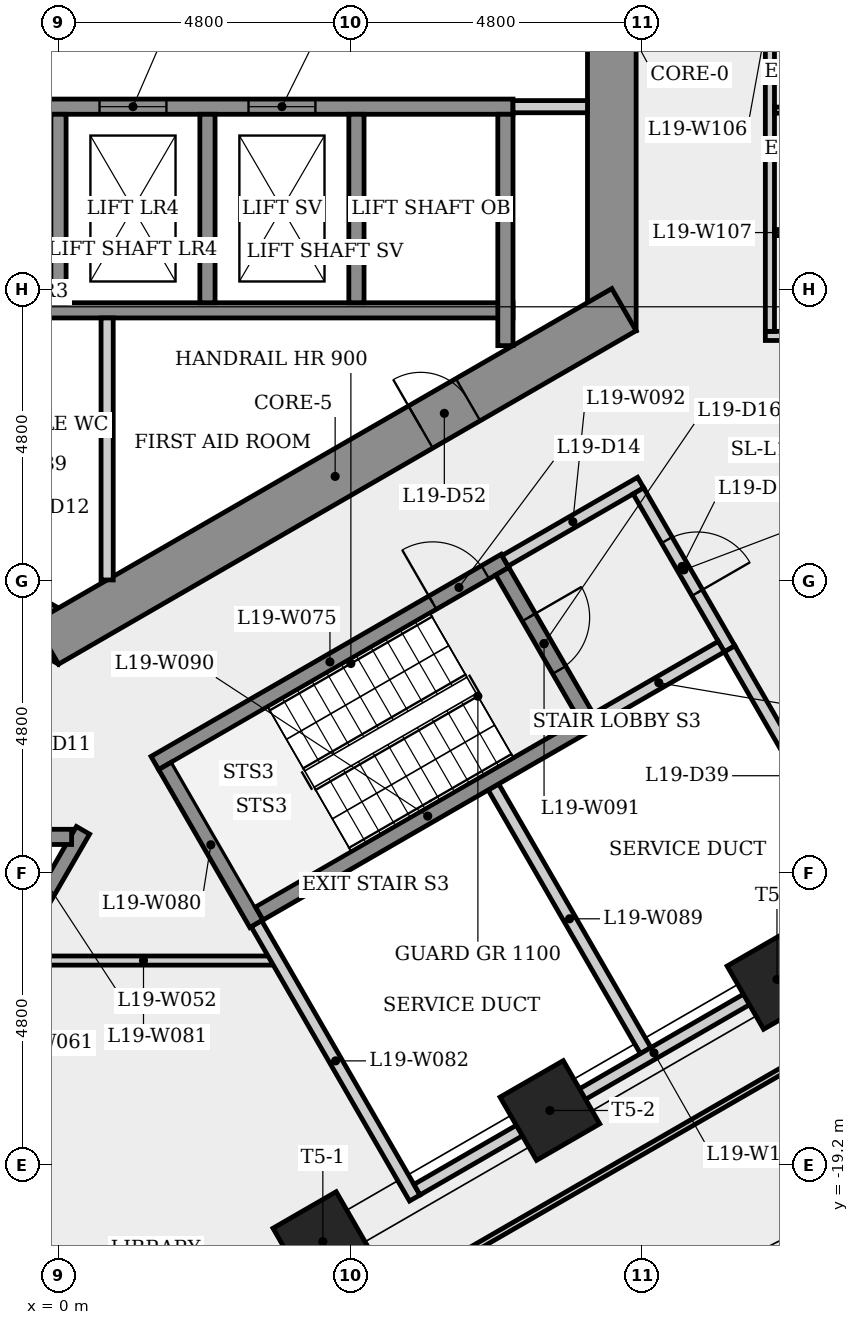
"""IFC4 building model, lengths in metres.
Left out: names, types, materials, properties, quantities, classifications, styles, units other than length and angle.
Written with IfcOpenShell. Run it as: python <this file> out.ifc"""

import sys

from ifc_helpers import new_model, si_unit, direction, frame, frame_2d, origin, origin_2d, place, context, subcontext, project, spatial, rectangle, extrude, element, fill, save


model = new_model("IFC4")
c1 = context("Model", 3, precision=1e-05, world=origin(), true_north=direction((0.0, 1.0)))
c2 = subcontext(c1, "Body", "Model", "MODEL_VIEW")
j1 = project(units=[si_unit("LENGTHUNIT", "METRE"), si_unit("PLANEANGLEUNIT", "RADIAN")], contexts=[c1])
p1 = place(None, origin())
s1 = spatial("IfcSite", under=j1, at=p1, CompositionType="ELEMENT")
p2 = place(p1, origin())
s2 = spatial("IfcBuilding", under=s1, at=p2, CompositionType="ELEMENT")
p3 = place(p2, frame((0.0, 0.0, 74.3)))
s3 = spatial("IfcBuildingStorey", under=s2, at=p3, CompositionType="ELEMENT", Elevation=74.3)
p4 = place(p3, frame((9.1, -5.485, 0.0), z_axis=(0.0, 0.0, 1.0), x_axis=(0.0, 1.0, 0.0)))
e1 = element("IfcWall", 1, at=p4, inside=s3, PredefinedType="SHEAR", context=c2, shape_type="SweptSolid", body=[
    extrude(rectangle(XDim=10.97, YDim=0.8, at=frame_2d((5.485, 0.0))), origin(), (0.0, 0.0, 1.0), 4.0),
])
p5 = place(p4, frame((4.685, 0.0, 0.0)))
e2 = element("IfcOpeningElement", 2, at=p5, cuts=e1, PredefinedType="OPENING", context=c2, shape_type="SweptSolid", body=[
    extrude(rectangle(XDim=1.6, YDim=2.1, at=frame_2d((0.8, 1.05))), frame((0.0, 0.41, 0.0), z_axis=(0.0, -1.0, 0.0), x_axis=(1.0, 0.0, 0.0)), (0.0, 0.0, 1.0), 0.82),
])
p6 = place(p3, frame((-9.3, -5.138, 0.0), z_axis=(0.0, 0.0, 1.0), x_axis=(0.866023993627, -0.500002442456, 0.0)))
e3 = element("IfcWall", 3, at=p6, inside=s3, PredefinedType="SHEAR", context=c2, shape_type="SweptSolid", body=[
    extrude(rectangle(XDim=10.97, YDim=0.8, at=frame_2d((5.485, 0.0))), origin(), (0.0, 0.0, 1.0), 4.0),
])
p7 = place(p6, frame((2.268, 0.0, 0.0)))
e4 = element("IfcOpeningElement", 4, at=p7, cuts=e3, PredefinedType="OPENING", context=c2, shape_type="SweptSolid", body=[
    extrude(rectangle(XDim=0.9, YDim=2.1, at=frame_2d((0.45, 1.05))), frame((0.0, 0.41, 0.0), z_axis=(0.0, -1.0, 0.0), x_axis=(1.0, 0.0, 0.0)), (0.0, 0.0, 1.0), 0.82),
])
p8 = place(p6, frame((8.903, 0.0, 0.0)))
e5 = element("IfcOpeningElement", 5, at=p8, cuts=e3, PredefinedType="OPENING", context=c2, shape_type="SweptSolid", body=[
    extrude(rectangle(XDim=0.9, YDim=2.1, at=frame_2d((0.45, 1.05))), frame((0.0, 0.41, 0.0), z_axis=(0.0, -1.0, 0.0), x_axis=(1.0, 0.0, 0.0)), (0.0, 0.0, 1.0), 0.82),
])
p9 = place(p3, frame((-0.2, -10.623, 0.0), z_axis=(0.0, 0.0, 1.0), x_axis=(0.866023993627, 0.500002442456, 0.0)))
e6 = element("IfcWall", 6, at=p9, inside=s3, PredefinedType="SHEAR", context=c2, shape_type="SweptSolid", body=[
    extrude(rectangle(XDim=10.97, YDim=0.8, at=frame_2d((5.485, 0.0))), origin(), (0.0, 0.0, 1.0), 4.0),
])
p10 = place(p9, frame((7.108, 0.0, 0.0)))
e7 = element("IfcOpeningElement", 7, at=p10, cuts=e6, PredefinedType="OPENING", context=c2, shape_type="SweptSolid", body=[
    extrude(rectangle(XDim=0.9, YDim=2.1, at=frame_2d((0.45, 1.05))), frame((0.0, 0.41, 0.0), z_axis=(0.0, -1.0, 0.0), x_axis=(1.0, 0.0, 0.0)), (0.0, 0.0, 1.0), 0.82),
])
for number, where, z_axis, x_axis in (
    (8, (4.348, -20.466, 0.0), (0.0, 0.0, 1.0), (0.5, -0.866, 0.0)),
    (9, (8.082, -18.31, 0.0), (0.0, 0.0, 1.0), (0.5, -0.866, 0.0)),
    (10, (11.816, -16.154, 0.0), (0.0, 0.0, 1.0), (0.5, -0.866, 0.0)),
):
    element("IfcColumn", number, at=place(p3, frame(where, z_axis=z_axis, x_axis=x_axis)), inside=s3, PredefinedType="COLUMN", context=c2, shape_type="SweptSolid", body=[
        extrude(rectangle(XDim=1.2, YDim=1.2, at=origin_2d()), origin(), (0.0, 0.0, 1.0), 4.0),
    ])
p11 = place(p3, frame((-7.225, -5.15, 0.0), z_axis=(0.0, 0.0, 1.0), x_axis=(1.0, 0.0, 0.0)))
e11 = element("IfcWall", 11, at=p11, inside=s3, PredefinedType="SHEAR", context=c2, shape_type="SweptSolid", body=[
    extrude(rectangle(XDim=14.7, YDim=0.25, at=frame_2d((7.35, 0.0))), origin(), (0.0, 0.0, 1.0), 3.6),
])
p12 = place(p3, frame((-7.225, -1.8, 0.0), z_axis=(0.0, 0.0, 1.0), x_axis=(1.0, 0.0, 0.0)))
e12 = element("IfcWall", 12, at=p12, inside=s3, PredefinedType="SHEAR", context=c2, shape_type="SweptSolid", body=[
    extrude(rectangle(XDim=14.7, YDim=0.25, at=frame_2d((7.35, 0.0))), origin(), (0.0, 0.0, 1.0), 3.6),
])
p13 = place(p12, frame((0.597, 0.0, 0.0)))
e13 = element("IfcOpeningElement", 13, at=p13, cuts=e12, PredefinedType="OPENING", context=c2, shape_type="SweptSolid", body=[
    extrude(rectangle(XDim=1.1, YDim=2.1, at=frame_2d((0.55, 1.05))), frame((0.0, 0.135, 0.0), z_axis=(0.0, -1.0, 0.0), x_axis=(1.0, 0.0, 0.0)), (0.0, 0.0, 1.0), 0.27),
])
p14 = place(p12, frame((3.0, 0.0, 0.0)))
e14 = element("IfcOpeningElement", 14, at=p14, cuts=e12, PredefinedType="OPENING", context=c2, shape_type="SweptSolid", body=[
    extrude(rectangle(XDim=1.1, YDim=2.1, at=frame_2d((0.55, 1.05))), frame((0.0, 0.135, 0.0), z_axis=(0.0, -1.0, 0.0), x_axis=(1.0, 0.0, 0.0)), (0.0, 0.0, 1.0), 0.27),
])
p15 = place(p12, frame((5.45, 0.0, 0.0)))
e15 = element("IfcOpeningElement", 15, at=p15, cuts=e12, PredefinedType="OPENING", context=c2, shape_type="SweptSolid", body=[
    extrude(rectangle(XDim=1.1, YDim=2.1, at=frame_2d((0.55, 1.05))), frame((0.0, 0.135, 0.0), z_axis=(0.0, -1.0, 0.0), x_axis=(1.0, 0.0, 0.0)), (0.0, 0.0, 1.0), 0.27),
])
p16 = place(p12, frame((7.9, 0.0, 0.0)))
e16 = element("IfcOpeningElement", 16, at=p16, cuts=e12, PredefinedType="OPENING", context=c2, shape_type="SweptSolid", body=[
    extrude(rectangle(XDim=1.1, YDim=2.1, at=frame_2d((0.55, 1.05))), frame((0.0, 0.135, 0.0), z_axis=(0.0, -1.0, 0.0), x_axis=(1.0, 0.0, 0.0)), (0.0, 0.0, 1.0), 0.27),
])
p17 = place(p12, frame((10.35, 0.0, 0.0)))
e17 = element("IfcOpeningElement", 17, at=p17, cuts=e12, PredefinedType="OPENING", context=c2, shape_type="SweptSolid", body=[
    extrude(rectangle(XDim=1.1, YDim=2.1, at=frame_2d((0.55, 1.05))), frame((0.0, 0.135, 0.0), z_axis=(0.0, -1.0, 0.0), x_axis=(1.0, 0.0, 0.0)), (0.0, 0.0, 1.0), 0.27),
])
p18 = place(p3, frame((-0.902, -15.962, 0.0), z_axis=(0.0, 0.0, 1.0), x_axis=(0.499981517636, 0.866036074319, 0.0)))
e18 = element("IfcWall", 18, at=p18, inside=s3, PredefinedType="SHEAR", context=c2, shape_type="SweptSolid", body=[
    extrude(rectangle(XDim=2.61, YDim=0.25, at=frame_2d((1.305, 0.0))), origin(), (0.0, 0.0, 1.0), 3.6),
])
p19 = place(p3, frame((-0.725, -13.81, 0.0), z_axis=(0.0, 0.0, 1.0), x_axis=(1.0, 0.0, 0.0)))
e19 = element("IfcWall", 19, at=p19, inside=s3, PredefinedType="SHEAR", context=c2, shape_type="SweptSolid", body=[
    extrude(rectangle(XDim=0.941, YDim=0.25, at=frame_2d((0.47, 0.0))), origin(), (0.0, 0.0, 1.0), 4.0),
])
p20 = place(p3, frame((0.0, -1.925, 0.0), z_axis=(0.0, 0.0, 1.0), x_axis=(0.0, -1.0, 0.0)))
e20 = element("IfcWall", 20, at=p20, inside=s3, PredefinedType="SHEAR", context=c2, shape_type="SweptSolid", body=[
    extrude(rectangle(XDim=3.1, YDim=0.25, at=frame_2d((1.55, 0.0))), origin(), (0.0, 0.0, 1.0), 4.0),
])
p21 = place(p3, frame((0.8, -5.275, 0.0), z_axis=(0.0, 0.0, 1.0), x_axis=(0.0, -1.0, 0.0)))
e21 = element("IfcWall", 21, at=p21, inside=s3, PredefinedType="PARTITIONING", context=c2, shape_type="SweptSolid", body=[
    extrude(rectangle(XDim=4.309, YDim=0.2, at=frame_2d((2.155, 0.0))), origin(), (0.0, 0.0, 1.0), 3.6),
])
p22 = place(p3, frame((1.585, -12.595, 0.0), z_axis=(0.0, 0.0, 1.0), x_axis=(0.866036417653, 0.499980922934, 0.0)))
e22 = element("IfcWall", 22, at=p22, inside=s3, PredefinedType="SHEAR", context=c2, shape_type="SweptSolid", body=[
    extrude(rectangle(XDim=6.65, YDim=0.25, at=frame_2d((3.325, 0.0))), origin(), (0.0, 0.0, 1.0), 3.6),
])
p23 = place(p22, frame((5.275, 0.0, 0.0)))
e23 = element("IfcOpeningElement", 23, at=p23, cuts=e22, PredefinedType="OPENING", context=c2, shape_type="SweptSolid", body=[
    extrude(rectangle(XDim=1.0, YDim=2.1, at=frame_2d((0.5, 1.05))), frame((0.0, 0.135, 0.0), z_axis=(0.0, -1.0, 0.0), x_axis=(1.0, 0.0, 0.0)), (0.0, 0.0, 1.0), 0.27),
])
p24 = place(p3, frame((2.45, -1.925, 0.0), z_axis=(0.0, 0.0, 1.0), x_axis=(0.0, -1.0, 0.0)))
e24 = element("IfcWall", 24, at=p24, inside=s3, PredefinedType="SHEAR", context=c2, shape_type="SweptSolid", body=[
    extrude(rectangle(XDim=3.1, YDim=0.25, at=frame_2d((1.55, 0.0))), origin(), (0.0, 0.0, 1.0), 4.0),
])
p25 = place(p3, frame((3.256, -15.239, 0.0), z_axis=(0.0, 0.0, 1.0), x_axis=(-0.50002537861, 0.866010750942, 0.0)))
e25 = element("IfcWall", 25, at=p25, inside=s3, PredefinedType="SHEAR", context=c2, shape_type="SweptSolid", body=[
    extrude(rectangle(XDim=3.0, YDim=0.25, at=frame_2d((1.5, 0.0))), origin(), (0.0, 0.0, 1.0), 3.6),
])
p26 = place(p3, frame((3.505, -15.844, 0.0), z_axis=(0.0, 0.0, 1.0), x_axis=(-1.0, 0.0, 0.0)))
e26 = element("IfcWall", 26, at=p26, inside=s3, PredefinedType="PARTITIONING", context=c2, shape_type="SweptSolid", body=[
    extrude(rectangle(XDim=4.214, YDim=0.15, at=frame_2d((2.107, 0.0))), origin(), (0.0, 0.0, 1.0), 3.6),
])
p27 = place(p3, frame((3.256, -15.239, 0.0), z_axis=(0.0, 0.0, 1.0), x_axis=(0.500021393879, -0.866013051671, 0.0)))
e27 = element("IfcWall", 27, at=p27, inside=s3, PredefinedType="PLUMBINGWALL", context=c2, shape_type="SweptSolid", body=[
    extrude(rectangle(XDim=5.208, YDim=0.2, at=frame_2d((2.604, 0.0))), origin(), (0.0, 0.0, 1.0), 3.6),
])
p28 = place(p3, frame((4.9, -1.925, 0.0), z_axis=(0.0, 0.0, 1.0), x_axis=(0.0, -1.0, 0.0)))
e28 = element("IfcWall", 28, at=p28, inside=s3, PredefinedType="SHEAR", context=c2, shape_type="SweptSolid", body=[
    extrude(rectangle(XDim=3.1, YDim=0.25, at=frame_2d((1.55, 0.0))), origin(), (0.0, 0.0, 1.0), 4.0),
])
p29 = place(p3, frame((7.153, -12.989, 0.0), z_axis=(0.0, 0.0, 1.0), x_axis=(0.499998165157, -0.866026463129, 0.0)))
e29 = element("IfcWall", 29, at=p29, inside=s3, PredefinedType="PLUMBINGWALL", context=c2, shape_type="SweptSolid", body=[
    extrude(rectangle(XDim=5.008, YDim=0.2, at=frame_2d((2.504, 0.0))), origin(), (0.0, 0.0, 1.0), 3.6),
])
p30 = place(p3, frame((3.301, -15.068, 0.0), z_axis=(0.0, 0.0, 1.0), x_axis=(0.866035036182, 0.499983315828, 0.0)))
e30 = element("IfcWall", 30, at=p30, inside=s3, PredefinedType="SHEAR", context=c2, shape_type="SweptSolid", body=[
    extrude(rectangle(XDim=6.4, YDim=0.25, at=frame_2d((3.2, 0.0))), origin(), (0.0, 0.0, 1.0), 4.0),
])
p31 = place(p3, frame((7.298, -9.441, 0.0), z_axis=(0.0, 0.0, 1.0), x_axis=(0.500034990121, -0.866005201286, 0.0)))
e31 = element("IfcWall", 31, at=p31, inside=s3, PredefinedType="SHEAR", context=c2, shape_type="SweptSolid", body=[
    extrude(rectangle(XDim=2.75, YDim=0.25, at=frame_2d((1.375, 0.0))), origin(), (0.0, 0.0, 1.0), 3.6),
])
p32 = place(p31, frame((0.875, 0.0, 0.0)))
e32 = element("IfcOpeningElement", 32, at=p32, cuts=e31, PredefinedType="OPENING", context=c2, shape_type="SweptSolid", body=[
    extrude(rectangle(XDim=1.0, YDim=2.1, at=frame_2d((0.5, 1.05))), frame((0.0, 0.135, 0.0), z_axis=(0.0, -1.0, 0.0), x_axis=(1.0, 0.0, 0.0)), (0.0, 0.0, 1.0), 0.27),
])
p33 = place(p3, frame((7.344, -9.27, 0.0), z_axis=(0.0, 0.0, 1.0), x_axis=(0.866005588531, 0.500034319456, 0.0)))
e33 = element("IfcWall", 33, at=p33, inside=s3, PredefinedType="PARTITIONING", context=c2, shape_type="SweptSolid", body=[
    extrude(rectangle(XDim=2.575, YDim=0.2, at=frame_2d((1.288, 0.0))), origin(), (0.0, 0.0, 1.0), 3.6),
])
p34 = place(p3, frame((7.35, -1.925, 0.0), z_axis=(0.0, 0.0, 1.0), x_axis=(0.0, -1.0, 0.0)))
e34 = element("IfcWall", 34, at=p34, inside=s3, PredefinedType="SHEAR", context=c2, shape_type="SweptSolid", body=[
    extrude(rectangle(XDim=3.805, YDim=0.25, at=frame_2d((1.903, 0.0))), origin(), (0.0, 0.0, 1.0), 3.6),
])
p35 = place(p3, frame((8.7, -1.8, 0.0), z_axis=(0.0, 0.0, 1.0), x_axis=(-1.0, 0.0, 0.0)))
e35 = element("IfcWall", 35, at=p35, inside=s3, PredefinedType="PARTITIONING", context=c2, shape_type="SweptSolid", body=[
    extrude(rectangle(XDim=1.225, YDim=0.2, at=frame_2d((0.613, 0.0))), origin(), (0.0, 0.0, 1.0), 3.6),
])
p36 = place(p3, frame((9.537, -8.119, 0.0), z_axis=(0.0, 0.0, 1.0), x_axis=(0.499990139034, -0.866031096941, 0.0)))
e36 = element("IfcWall", 36, at=p36, inside=s3, PredefinedType="PARTITIONING", context=c2, shape_type="SweptSolid", body=[
    extrude(rectangle(XDim=3.0, YDim=0.2, at=frame_2d((1.5, 0.0))), origin(), (0.0, 0.0, 1.0), 3.6),
])
p37 = place(p36, frame((0.935, 0.0, 0.0)))
e37 = element("IfcOpeningElement", 37, at=p37, cuts=e36, PredefinedType="OPENING", context=c2, shape_type="SweptSolid", body=[
    extrude(rectangle(XDim=1.0, YDim=2.1, at=frame_2d((0.5, 1.05))), frame((0.0, 0.11, 0.0), z_axis=(0.0, -1.0, 0.0), x_axis=(1.0, 0.0, 0.0)), (0.0, 0.0, 1.0), 0.22),
])
p38 = place(p3, frame((5.896, -19.612, 0.0), z_axis=(0.0, 0.0, 1.0), x_axis=(0.866024315419, 0.5000018851, 0.0)))
e38 = element("IfcWall", 38, at=p38, inside=s3, PredefinedType="PLUMBINGWALL", context=c2, shape_type="SweptSolid", body=[
    extrude(rectangle(XDim=9.0, YDim=0.2, at=frame_2d((4.5, 0.0))), origin(), (0.0, 0.0, 1.0), 2.675),
])
p39 = place(p3, frame((10.901, -10.681, 0.0), z_axis=(0.0, 0.0, 1.0), x_axis=(-0.866007538022, -0.500030943131, 0.0)))
e39 = element("IfcWall", 39, at=p39, inside=s3, PredefinedType="PLUMBINGWALL", context=c2, shape_type="SweptSolid", body=[
    extrude(rectangle(XDim=2.375, YDim=0.2, at=frame_2d((1.188, 0.0))), origin(), (0.0, 0.0, 1.0), 3.6),
])
p40 = place(p3, frame((11.037, -10.717, 0.0), z_axis=(0.0, 0.0, 1.0), x_axis=(0.500005202617, -0.866022400031, 0.0)))
e40 = element("IfcWall", 40, at=p40, inside=s3, PredefinedType="PLUMBINGWALL", context=c2, shape_type="SweptSolid", body=[
    extrude(rectangle(XDim=5.033, YDim=0.2, at=frame_2d((2.516, 0.0))), origin(), (0.0, 0.0, 1.0), 3.6),
])
p41 = place(p3, frame((11.625, -5.571, 0.0), z_axis=(0.0, 0.0, 1.0), x_axis=(1.0, 0.0, 0.0)))
e41 = element("IfcWall", 41, at=p41, inside=s3, PredefinedType="PARTITIONING", context=c2, shape_type="SweptSolid", body=[
    extrude(rectangle(XDim=4.915, YDim=0.15, at=frame_2d((2.457, 0.0))), origin(), (0.0, 0.0, 1.0), 3.6),
])
p42 = place(p41, frame((1.99, 0.0, 0.0)))
e42 = element("IfcOpeningElement", 42, at=p42, cuts=e41, PredefinedType="OPENING", context=c2, shape_type="SweptSolid", body=[
    extrude(rectangle(XDim=0.9, YDim=2.1, at=frame_2d((0.45, 1.05))), frame((0.0, 0.085, 0.0), z_axis=(0.0, -1.0, 0.0), x_axis=(1.0, 0.0, 0.0)), (0.0, 0.0, 1.0), 0.17),
])
p43 = place(p3, frame((11.7, -5.496, 0.0), z_axis=(0.0, 0.0, 1.0), x_axis=(0.0, 1.0, 0.0)))
e43 = element("IfcWall", 43, at=p43, inside=s3, PredefinedType="PARTITIONING", context=c2, shape_type="SweptSolid", body=[
    extrude(rectangle(XDim=10.741, YDim=0.15, at=frame_2d((5.371, 0.0))), origin(), (0.0, 0.0, 1.0), 3.6),
])
p44 = place(p43, frame((6.052, 0.0, 0.0)))
e44 = element("IfcOpeningElement", 44, at=p44, cuts=e43, PredefinedType="OPENING", context=c2, shape_type="SweptSolid", body=[
    extrude(rectangle(XDim=0.9, YDim=2.1, at=frame_2d((0.45, 1.05))), frame((0.0, 0.085, 0.0), z_axis=(0.0, -1.0, 0.0), x_axis=(1.0, 0.0, 0.0)), (0.0, 0.0, 1.0), 0.17),
])
p45 = place(p3, frame((11.775, -3.871, 0.0), z_axis=(0.0, 0.0, 1.0), x_axis=(1.0, 0.0, 0.0)))
e45 = element("IfcWall", 45, at=p45, inside=s3, PredefinedType="PARTITIONING", context=c2, shape_type="SweptSolid", body=[
    extrude(rectangle(XDim=2.375, YDim=0.1, at=frame_2d((1.188, 0.0))), origin(), (0.0, 0.0, 1.0), 3.6),
])
p46 = place(p45, frame((0.762, 0.0, 0.0)))
e46 = element("IfcOpeningElement", 46, at=p46, cuts=e45, PredefinedType="OPENING", context=c2, shape_type="SweptSolid", body=[
    extrude(rectangle(XDim=0.8, YDim=2.1, at=frame_2d((0.4, 1.05))), frame((0.0, 0.06, 0.0), z_axis=(0.0, -1.0, 0.0), x_axis=(1.0, 0.0, 0.0)), (0.0, 0.0, 1.0), 0.12),
])
p47 = place(p3, frame((11.775, -1.857, 0.0), z_axis=(0.0, 0.0, 1.0), x_axis=(1.0, 0.0, 0.0)))
e47 = element("IfcWall", 47, at=p47, inside=s3, PredefinedType="PARTITIONING", context=c2, shape_type="SweptSolid", body=[
    extrude(rectangle(XDim=9.01, YDim=0.1, at=frame_2d((4.505, 0.0))), origin(), (0.0, 0.0, 1.0), 3.6),
])
p48 = place(p3, frame((15.974, -15.302, 0.0), z_axis=(0.0, 0.0, 1.0), x_axis=(-0.866022405705, -0.500005192789, 0.0)))
e48 = element("IfcWall", 48, at=p48, inside=s3, PredefinedType="PARTITIONING", context=c2, shape_type="SweptSolid", body=[
    extrude(rectangle(XDim=28.179, YDim=0.1, at=frame_2d((14.089, 0.0))), origin(), (0.0, 0.0, 1.0), 3.6),
])
p49 = place(p3, frame((17.784, -18.438, 0.0), z_axis=(0.0, 0.0, 1.0), x_axis=(-0.866027742962, -0.499995948403, 0.0)))
e49 = element("IfcWall", 49, at=p49, inside=s3, PredefinedType="PARTITIONING", context=c2, shape_type="SweptSolid", body=[
    extrude(rectangle(XDim=28.178, YDim=0.1, at=frame_2d((14.089, 0.0))), origin(), (0.0, 0.0, 1.0), 3.275),
])
p50 = place(p16, origin())
e50 = element("IfcDoor", 50, at=p50, inside=s3, OperationType="SLIDING_TO_LEFT", PredefinedType="DOOR", context=c2, shape_type="SweptSolid", body=[
    extrude(rectangle(XDim=1.1, YDim=2.1, at=frame_2d((0.55, 1.05))), frame((0.0, 0.025, 0.0), z_axis=(0.0, -1.0, 0.0), x_axis=(1.0, 0.0, 0.0)), (0.0, 0.0, 1.0), 0.05),
])
fill(e16, e50)
p51 = place(p17, origin())
e51 = element("IfcDoor", 51, at=p51, inside=s3, OperationType="SLIDING_TO_LEFT", PredefinedType="DOOR", context=c2, shape_type="SweptSolid", body=[
    extrude(rectangle(XDim=1.1, YDim=2.1, at=frame_2d((0.55, 1.05))), frame((0.0, 0.025, 0.0), z_axis=(0.0, -1.0, 0.0), x_axis=(1.0, 0.0, 0.0)), (0.0, 0.0, 1.0), 0.05),
])
fill(e17, e51)
p52 = place(p23, origin())
e52 = element("IfcDoor", 52, at=p52, inside=s3, OperationType="SINGLE_SWING_LEFT", PredefinedType="DOOR", context=c2, shape_type="SweptSolid", body=[
    extrude(rectangle(XDim=1.0, YDim=2.1, at=frame_2d((0.5, 1.05))), frame((0.0, 0.025, 0.0), z_axis=(0.0, -1.0, 0.0), x_axis=(1.0, 0.0, 0.0)), (0.0, 0.0, 1.0), 0.05),
])
fill(e23, e52)
p53 = place(p37, origin())
e53 = element("IfcDoor", 53, at=p53, inside=s3, OperationType="SINGLE_SWING_RIGHT", PredefinedType="DOOR", context=c2, shape_type="SweptSolid", body=[
    extrude(rectangle(XDim=1.0, YDim=2.1, at=frame_2d((0.5, 1.05))), frame((0.0, 0.025, 0.0), z_axis=(0.0, -1.0, 0.0), x_axis=(1.0, 0.0, 0.0)), (0.0, 0.0, 1.0), 0.05),
])
fill(e37, e53)
p54 = place(p32, origin())
e54 = element("IfcDoor", 54, at=p54, inside=s3, OperationType="SINGLE_SWING_LEFT", PredefinedType="DOOR", context=c2, shape_type="SweptSolid", body=[
    extrude(rectangle(XDim=1.0, YDim=2.1, at=frame_2d((0.5, 1.05))), frame((0.0, 0.025, 0.0), z_axis=(0.0, -1.0, 0.0), x_axis=(1.0, 0.0, 0.0)), (0.0, 0.0, 1.0), 0.05),
])
fill(e32, e54)
p55 = place(p10, origin())
e55 = element("IfcDoor", 55, at=p55, inside=s3, OperationType="SINGLE_SWING_LEFT", PredefinedType="DOOR", context=c2, shape_type="SweptSolid", body=[
    extrude(rectangle(XDim=0.9, YDim=2.1, at=frame_2d((0.45, 1.05))), frame((0.0, 0.025, 0.0), z_axis=(0.0, -1.0, 0.0), x_axis=(1.0, 0.0, 0.0)), (0.0, 0.0, 1.0), 0.05),
])
fill(e7, e55)
save(model, sys.argv[1])
